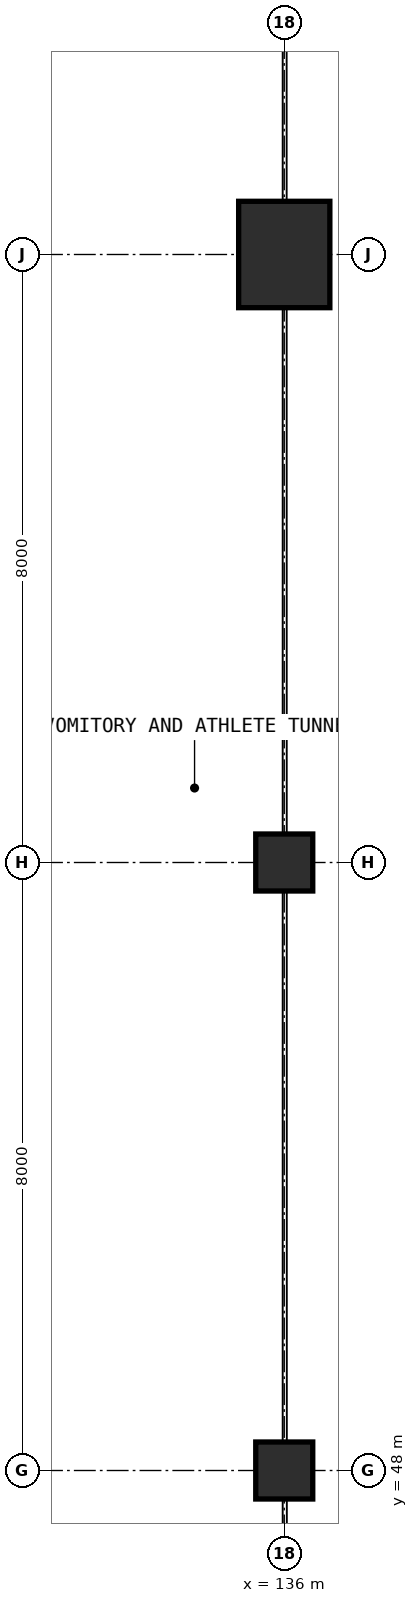
"""IFC4 building model, lengths in metres.
Left out: names, types, materials, properties, quantities, classifications, styles, units other than length and angle.
Written with IfcOpenShell. Run it as: python <this file> out.ifc"""

import sys

from ifc_helpers import new_model, si_unit, direction, frame, origin, origin_2d, place, context, subcontext, project, spatial, rectangle, extrude, element, save


model = new_model("IFC4")
c1 = context("Model", 3, precision=1e-05, world=origin(), true_north=direction((0.0, 1.0)))
c2 = subcontext(c1, "Body", "Model", "MODEL_VIEW")
j1 = project(units=[si_unit("LENGTHUNIT", "METRE"), si_unit("PLANEANGLEUNIT", "RADIAN")], contexts=[c1])
p1 = place(None, origin())
s1 = spatial("IfcSite", under=j1, at=p1, CompositionType="ELEMENT")
p2 = place(p1, origin())
s2 = spatial("IfcBuilding", under=s1, at=p2, CompositionType="ELEMENT")
p3 = place(p2, origin())
s3 = spatial("IfcBuildingStorey", under=s2, at=p3, CompositionType="ELEMENT", Elevation=0.0)
for number, where, z_axis, x_axis in (
    (1, (136.0, 48.0, 0.0), (0.0, 0.0, 1.0), (1.0, 0.0, 0.0)),
    (2, (136.0, 56.0, 0.0), (0.0, 0.0, 1.0), (1.0, 0.0, 0.0)),
):
    element("IfcColumn", number, at=place(p3, frame(where, z_axis=z_axis, x_axis=x_axis)), inside=s3, PredefinedType="COLUMN", context=c2, shape_type="SweptSolid", body=[
        extrude(rectangle(XDim=0.75, YDim=0.75, at=origin_2d()), origin(), (0.0, 0.0, 1.0), 5.4),
    ])
p4 = place(p3, frame((136.0, 64.0, 0.0), z_axis=(0.0, 0.0, 1.0), x_axis=(1.0, 0.0, 0.0)))
e3 = element("IfcColumn", 3, at=p4, inside=s3, PredefinedType="COLUMN", context=c2, shape_type="SweptSolid", body=[
    extrude(rectangle(XDim=1.2, YDim=1.4, at=origin_2d()), origin(), (0.0, 0.0, 1.0), 5.4),
])
save(model, sys.argv[1])
